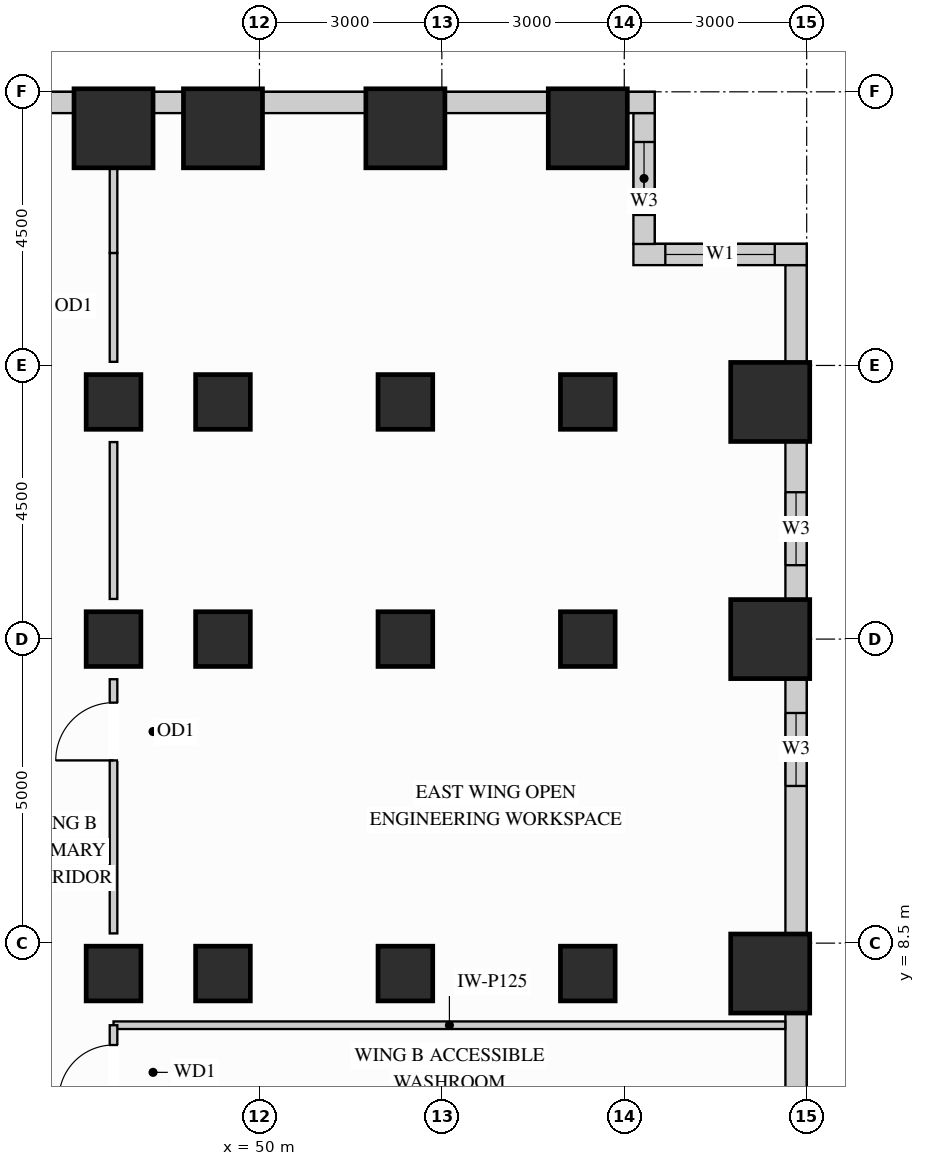
"""IFC4 building model, lengths in metres.
Left out: names, types, materials, properties, quantities, classifications, styles, units other than length and angle.
Written with IfcOpenShell. Run it as: python <this file> out.ifc"""

import sys

from ifc_helpers import new_model, si_unit, direction, frame, frame_2d, origin, origin_2d, place, context, subcontext, project, spatial, rectangle, extrude, source, transform, mapped, element, fill, save


model = new_model("IFC4")
c1 = context("Model", 3, precision=1e-05, world=origin(), true_north=direction((0.0, 1.0)))
c2 = subcontext(c1, "Body", "Model", "MODEL_VIEW")
j1 = project(units=[si_unit("LENGTHUNIT", "METRE"), si_unit("PLANEANGLEUNIT", "RADIAN")], contexts=[c1])
p1 = place(None, origin())
s1 = spatial("IfcSite", under=j1, at=p1, CompositionType="ELEMENT")
p2 = place(p1, origin())
s2 = spatial("IfcBuilding", under=s1, at=p2, CompositionType="ELEMENT")
p3 = place(p2, frame((0.0, 0.0, 65.7)))
s3 = spatial("IfcBuildingStorey", under=s2, at=p3, CompositionType="ELEMENT", Elevation=65.7)
m1 = source(origin(), c2, "Body", "SweptSolid", [
    extrude(rectangle(XDim=0.9, YDim=0.9, at=origin_2d()), origin(), (0.0, 0.0, 1.0), 3.38),
])
for number, where, z_axis, x_axis in (
    (1, (47.6, 13.5, 0.0), (0.0, 0.0, 1.0), (1.0, 0.0, 0.0)),
    (2, (47.6, 8.0, 0.0), (0.0, 0.0, 1.0), (1.0, 0.0, 0.0)),
    (3, (47.6, 17.4, 0.0), (0.0, 0.0, 1.0), (1.0, 0.0, 0.0)),
    (4, (49.4, 13.5, 0.0), (0.0, 0.0, 1.0), (1.0, 0.0, 0.0)),
    (5, (49.4, 17.4, 0.0), (0.0, 0.0, 1.0), (1.0, 0.0, 0.0)),
    (6, (49.4, 8.0, 0.0), (0.0, 0.0, 1.0), (1.0, 0.0, 0.0)),
    (7, (52.4, 13.5, 0.0), (0.0, 0.0, 1.0), (1.0, 0.0, 0.0)),
    (8, (52.4, 17.4, 0.0), (0.0, 0.0, 1.0), (1.0, 0.0, 0.0)),
    (9, (52.4, 8.0, 0.0), (0.0, 0.0, 1.0), (1.0, 0.0, 0.0)),
    (10, (55.4, 13.5, 0.0), (0.0, 0.0, 1.0), (1.0, 0.0, 0.0)),
    (11, (55.4, 17.4, 0.0), (0.0, 0.0, 1.0), (1.0, 0.0, 0.0)),
    (12, (55.4, 8.0, 0.0), (0.0, 0.0, 1.0), (1.0, 0.0, 0.0)),
):
    element("IfcColumn", number, at=place(p3, frame(where, z_axis=z_axis, x_axis=x_axis)), inside=s3, PredefinedType="COLUMN", context=c2, shape_type="MappedRepresentation", body=[
        mapped(m1, transform((0.0, 0.0, 0.0), x_axis=(1.0, 0.0, 0.0), y_axis=(0.0, 1.0, 0.0), z_axis=(0.0, 0.0, 1.0))),
    ])
m2 = source(origin(), c2, "Body", "SweptSolid", [
    extrude(rectangle(XDim=1.3, YDim=1.3, at=origin_2d()), origin(), (0.0, 0.0, 1.0), 3.38),
])
for number, where, z_axis, x_axis in (
    (13, (47.6, 21.9, 0.0), (0.0, 0.0, 1.0), (1.0, 0.0, 0.0)),
    (14, (49.4, 21.9, 0.0), (0.0, 0.0, 1.0), (1.0, 0.0, 0.0)),
    (15, (52.4, 21.9, 0.0), (0.0, 0.0, 1.0), (1.0, 0.0, 0.0)),
    (16, (55.4, 21.9, 0.0), (0.0, 0.0, 1.0), (1.0, 0.0, 0.0)),
    (17, (58.4, 13.5, 0.0), (0.0, 0.0, 1.0), (1.0, 0.0, 0.0)),
    (18, (58.4, 17.4, 0.0), (0.0, 0.0, 1.0), (1.0, 0.0, 0.0)),
    (19, (58.4, 8.0, 0.0), (0.0, 0.0, 1.0), (1.0, 0.0, 0.0)),
):
    element("IfcColumn", number, at=place(p3, frame(where, z_axis=z_axis, x_axis=x_axis)), inside=s3, PredefinedType="COLUMN", context=c2, shape_type="MappedRepresentation", body=[
        mapped(m2, transform((0.0, 0.0, 0.0), x_axis=(1.0, 0.0, 0.0), y_axis=(0.0, 1.0, 0.0), z_axis=(0.0, 0.0, 1.0))),
    ])
m3 = source(origin(), c2, "Body", "SweptSolid", [
    extrude(rectangle(XDim=3.204, YDim=0.35, at=frame_2d((1.602, 0.0))), origin(), (0.0, 0.0, 1.0), 2.51),
])
p4 = place(p3, frame((58.825, 4.148, 0.0), z_axis=(0.0, 0.0, 1.0), x_axis=(0.0, 1.0, 0.0)))
e20 = element("IfcWall", 20, at=p4, inside=s3, PredefinedType="SOLIDWALL", context=c2, shape_type="MappedRepresentation", body=[
    mapped(m3, transform((0.0, 0.0, 0.0), x_axis=(1.0, 0.0, 0.0), y_axis=(0.0, 1.0, 0.0), z_axis=(0.0, 0.0, 1.0))),
])
p5 = place(p3, frame((58.825, 8.648, 0.0), z_axis=(0.0, 0.0, 1.0), x_axis=(0.0, 1.0, 0.0)))
e21 = element("IfcWall", 21, at=p5, inside=s3, PredefinedType="SOLIDWALL", context=c2, shape_type="SweptSolid", body=[
    extrude(rectangle(XDim=4.204, YDim=0.35, at=frame_2d((2.102, 0.0))), origin(), (0.0, 0.0, 1.0), 2.51),
])
p6 = place(p5, frame((2.437, 0.0, 0.78)))
e22 = element("IfcOpeningElement", 22, at=p6, cuts=e21, PredefinedType="OPENING", context=c2, shape_type="SweptSolid", body=[
    extrude(rectangle(XDim=1.2, YDim=1.55, at=frame_2d((0.6, 0.775))), frame((0.0, 0.185, 0.0), z_axis=(0.0, -1.0, 0.0), x_axis=(1.0, 0.0, 0.0)), (0.0, 0.0, 1.0), 0.37),
])
p7 = place(p3, frame((58.825, 14.148, 0.0), z_axis=(0.0, 0.0, 1.0), x_axis=(0.0, 1.0, 0.0)))
e23 = element("IfcWall", 23, at=p7, inside=s3, PredefinedType="SOLIDWALL", context=c2, shape_type="SweptSolid", body=[
    extrude(rectangle(XDim=2.604, YDim=0.35, at=frame_2d((1.302, 0.0))), origin(), (0.0, 0.0, 1.0), 2.51),
])
p8 = place(p7, frame((0.567, 0.0, 0.78)))
e24 = element("IfcOpeningElement", 24, at=p8, cuts=e23, PredefinedType="OPENING", context=c2, shape_type="SweptSolid", body=[
    extrude(rectangle(XDim=1.2, YDim=1.55, at=frame_2d((0.6, 0.775))), frame((0.0, 0.185, 0.0), z_axis=(0.0, -1.0, 0.0), x_axis=(1.0, 0.0, 0.0)), (0.0, 0.0, 1.0), 0.37),
])
m4 = source(origin(), c2, "Body", "SweptSolid", [
    extrude(rectangle(XDim=1.604, YDim=0.35, at=frame_2d((0.802, 0.0))), origin(), (0.0, 0.0, 1.0), 3.365),
])
p9 = place(p3, frame((58.825, 18.048, 0.0), z_axis=(0.0, 0.0, 1.0), x_axis=(0.0, 1.0, 0.0)))
e25 = element("IfcWall", 25, at=p9, inside=s3, PredefinedType="SOLIDWALL", context=c2, shape_type="MappedRepresentation", body=[
    mapped(m4, transform((0.0, 0.0, 0.0), x_axis=(1.0, 0.0, 0.0), y_axis=(0.0, 1.0, 0.0), z_axis=(0.0, 0.0, 1.0))),
])
p10 = place(p3, frame((59.0, 19.825, 0.0), z_axis=(0.0, 0.0, 1.0), x_axis=(-1.0, 0.0, 0.0)))
e26 = element("IfcWall", 26, at=p10, inside=s3, PredefinedType="SOLIDWALL", context=c2, shape_type="SweptSolid", body=[
    extrude(rectangle(XDim=2.85, YDim=0.35, at=frame_2d((1.425, 0.0))), origin(), (0.0, 0.0, 1.0), 3.365),
])
p11 = place(p10, frame((0.525, 0.0, 0.78)))
e27 = element("IfcOpeningElement", 27, at=p11, cuts=e26, PredefinedType="OPENING", context=c2, shape_type="SweptSolid", body=[
    extrude(rectangle(XDim=1.8, YDim=2.1, at=frame_2d((0.9, 1.05))), frame((0.0, 0.185, 0.0), z_axis=(0.0, -1.0, 0.0), x_axis=(1.0, 0.0, 0.0)), (0.0, 0.0, 1.0), 0.37),
])
p12 = place(p3, frame((56.325, 19.998, 0.0), z_axis=(0.0, 0.0, 1.0), x_axis=(0.0, 1.0, 0.0)))
e28 = element("IfcWall", 28, at=p12, inside=s3, PredefinedType="SOLIDWALL", context=c2, shape_type="SweptSolid", body=[
    extrude(rectangle(XDim=2.154, YDim=0.35, at=frame_2d((1.077, 0.0))), origin(), (0.0, 0.0, 1.0), 3.365),
])
p13 = place(p12, frame((0.477, 0.0, 0.78)))
e29 = element("IfcOpeningElement", 29, at=p13, cuts=e28, PredefinedType="OPENING", context=c2, shape_type="SweptSolid", body=[
    extrude(rectangle(XDim=1.2, YDim=2.1, at=frame_2d((0.6, 1.05))), frame((0.0, 0.185, 0.0), z_axis=(0.0, -1.0, 0.0), x_axis=(1.0, 0.0, 0.0)), (0.0, 0.0, 1.0), 0.37),
])
m5 = source(origin(), c2, "Body", "SweptSolid", [
    extrude(rectangle(XDim=0.452, YDim=0.35, at=frame_2d((0.226, 0.0))), origin(), (0.0, 0.0, 1.0), 3.365),
])
p14 = place(p3, frame((56.5, 22.325, 0.0), z_axis=(0.0, 0.0, 1.0), x_axis=(-1.0, 0.0, 0.0)))
e30 = element("IfcWall", 30, at=p14, inside=s3, PredefinedType="SOLIDWALL", context=c2, shape_type="MappedRepresentation", body=[
    mapped(m5, transform((0.0, 0.0, 0.0), x_axis=(1.0, 0.0, 0.0), y_axis=(0.0, 1.0, 0.0), z_axis=(0.0, 0.0, 1.0))),
])
m6 = source(origin(), c2, "Body", "SweptSolid", [
    extrude(rectangle(XDim=1.704, YDim=0.35, at=frame_2d((0.852, 0.0))), origin(), (0.0, 0.0, 1.0), 2.51),
])
for number, where, z_axis, x_axis in (
    (31, (54.752, 22.325, 0.0), (0.0, 0.0, 1.0), (-1.0, 0.0, 0.0)),
    (32, (51.752, 22.325, 0.0), (0.0, 0.0, 1.0), (-1.0, 0.0, 0.0)),
):
    element("IfcWall", number, at=place(p3, frame(where, z_axis=z_axis, x_axis=x_axis)), inside=s3, PredefinedType="SOLIDWALL", context=c2, shape_type="MappedRepresentation", body=[
        mapped(m6, transform((0.0, 0.0, 0.0), x_axis=(1.0, 0.0, 0.0), y_axis=(0.0, 1.0, 0.0), z_axis=(0.0, 0.0, 1.0))),
    ])
m7 = source(origin(), c2, "Body", "SweptSolid", [
    extrude(rectangle(XDim=0.504, YDim=0.35, at=frame_2d((0.252, 0.0))), origin(), (0.0, 0.0, 1.0), 3.365),
])
p15 = place(p3, frame((48.752, 22.325, 0.0), z_axis=(0.0, 0.0, 1.0), x_axis=(-1.0, 0.0, 0.0)))
e33 = element("IfcWall", 33, at=p15, inside=s3, PredefinedType="SOLIDWALL", context=c2, shape_type="MappedRepresentation", body=[
    mapped(m7, transform((0.0, 0.0, 0.0), x_axis=(1.0, 0.0, 0.0), y_axis=(0.0, 1.0, 0.0), z_axis=(0.0, 0.0, 1.0))),
])
p16 = place(p3, frame((46.952, 22.325, 0.0), z_axis=(0.0, 0.0, 1.0), x_axis=(-1.0, 0.0, 0.0)))
e34 = element("IfcWall", 34, at=p16, inside=s3, PredefinedType="SOLIDWALL", context=c2, shape_type="SweptSolid", body=[
    extrude(rectangle(XDim=6.304, YDim=0.35, at=frame_2d((3.152, 0.0))), origin(), (0.0, 0.0, 1.0), 2.51),
])
p17 = place(p16, frame((1.649, 0.0, 0.78)))
e35 = element("IfcOpeningElement", 35, at=p17, cuts=e34, PredefinedType="OPENING", context=c2, shape_type="SweptSolid", body=[
    extrude(rectangle(XDim=1.8, YDim=1.55, at=frame_2d((0.9, 0.775))), frame((0.0, 0.185, 0.0), z_axis=(0.0, -1.0, 0.0), x_axis=(1.0, 0.0, 0.0)), (0.0, 0.0, 1.0), 0.37),
])
p18 = place(p16, frame((3.817, 0.0, 0.78)))
e36 = element("IfcOpeningElement", 36, at=p18, cuts=e34, PredefinedType="OPENING", context=c2, shape_type="SweptSolid", body=[
    extrude(rectangle(XDim=1.8, YDim=1.55, at=frame_2d((0.9, 0.775))), frame((0.0, 0.185, 0.0), z_axis=(0.0, -1.0, 0.0), x_axis=(1.0, 0.0, 0.0)), (0.0, 0.0, 1.0), 0.37),
])
m8 = source(origin(), c2, "Body", "SweptSolid", [
    extrude(rectangle(XDim=11.048, YDim=0.125, at=frame_2d((5.524, 0.0))), origin(), (0.0, 0.0, 1.0), 3.365),
])
p19 = place(p3, frame((47.6, 7.15, 0.0), z_axis=(0.0, 0.0, 1.0), x_axis=(1.0, 0.0, 0.0)))
e37 = element("IfcWall", 37, at=p19, inside=s3, PredefinedType="PARTITIONING", context=c2, shape_type="MappedRepresentation", body=[
    mapped(m8, transform((0.0, 0.0, 0.0), x_axis=(1.0, 0.0, 0.0), y_axis=(0.0, 1.0, 0.0), z_axis=(0.0, 0.0, 1.0))),
])
p20 = place(p3, frame((47.6, 8.66, 0.0), z_axis=(0.0, 0.0, 1.0), x_axis=(0.0, 1.0, 0.0)))
e38 = element("IfcWall", 38, at=p20, inside=s3, PredefinedType="PARTITIONING", context=c2, shape_type="SweptSolid", body=[
    extrude(rectangle(XDim=4.18, YDim=0.125, at=frame_2d((2.09, 0.0))), origin(), (0.0, 0.0, 1.0), 2.67),
])
p21 = place(p20, frame((2.845, 0.0, 0.0)))
e39 = element("IfcOpeningElement", 39, at=p21, cuts=e38, PredefinedType="OPENING", context=c2, shape_type="SweptSolid", body=[
    extrude(rectangle(XDim=0.95, YDim=2.15, at=frame_2d((0.475, 1.075))), frame((0.0, 0.073, 0.0), z_axis=(0.0, -1.0, 0.0), x_axis=(1.0, 0.0, 0.0)), (0.0, 0.0, 1.0), 0.145),
])
m9 = source(origin(), c2, "Body", "SweptSolid", [
    extrude(rectangle(XDim=2.58, YDim=0.125, at=frame_2d((1.29, 0.0))), origin(), (0.0, 0.0, 1.0), 2.67),
])
p22 = place(p3, frame((47.6, 14.16, 0.0), z_axis=(0.0, 0.0, 1.0), x_axis=(0.0, 1.0, 0.0)))
e40 = element("IfcWall", 40, at=p22, inside=s3, PredefinedType="PARTITIONING", context=c2, shape_type="MappedRepresentation", body=[
    mapped(m9, transform((0.0, 0.0, 0.0), x_axis=(1.0, 0.0, 0.0), y_axis=(0.0, 1.0, 0.0), z_axis=(0.0, 0.0, 1.0))),
])
m10 = source(origin(), c2, "Body", "SweptSolid", [
    extrude(rectangle(XDim=1.79, YDim=0.125, at=frame_2d((0.895, 0.0))), origin(), (0.0, 0.0, 1.0), 2.67),
])
p23 = place(p3, frame((47.6, 18.06, 0.0), z_axis=(0.0, 0.0, 1.0), x_axis=(0.0, 1.0, 0.0)))
e41 = element("IfcWall", 41, at=p23, inside=s3, PredefinedType="PARTITIONING", context=c2, shape_type="MappedRepresentation", body=[
    mapped(m10, transform((0.0, 0.0, 0.0), x_axis=(1.0, 0.0, 0.0), y_axis=(0.0, 1.0, 0.0), z_axis=(0.0, 0.0, 1.0))),
])
m11 = source(origin(), c2, "Body", "SweptSolid", [
    extrude(rectangle(XDim=1.39, YDim=0.125, at=frame_2d((0.695, 0.0))), origin(), (0.0, 0.0, 1.0), 2.67),
])
p24 = place(p3, frame((47.6, 19.85, 0.0), z_axis=(0.0, 0.0, 1.0), x_axis=(0.0, 1.0, 0.0)))
e42 = element("IfcWall", 42, at=p24, inside=s3, PredefinedType="PARTITIONING", context=c2, shape_type="MappedRepresentation", body=[
    mapped(m11, transform((0.0, 0.0, 0.0), x_axis=(1.0, 0.0, 0.0), y_axis=(0.0, 1.0, 0.0), z_axis=(0.0, 0.0, 1.0))),
])
p25 = place(p3, frame((47.6, 5.65, 0.0), z_axis=(0.0, 0.0, 1.0), x_axis=(0.0, 1.0, 0.0)))
e43 = element("IfcWall", 43, at=p25, inside=s3, PredefinedType="PARTITIONING", context=c2, shape_type="SweptSolid", body=[
    extrude(rectangle(XDim=1.5, YDim=0.125, at=frame_2d((0.75, 0.0))), origin(), (0.0, 0.0, 1.0), 2.67),
])
p26 = place(p25, frame((0.275, 0.0, 0.0)))
e44 = element("IfcOpeningElement", 44, at=p26, cuts=e43, PredefinedType="OPENING", context=c2, shape_type="SweptSolid", body=[
    extrude(rectangle(XDim=0.9, YDim=2.15, at=frame_2d((0.45, 1.075))), frame((0.0, 0.073, 0.0), z_axis=(0.0, -1.0, 0.0), x_axis=(1.0, 0.0, 0.0)), (0.0, 0.0, 1.0), 0.145),
])
m12 = source(origin(), c2, "Body", "SweptSolid", [
    extrude(rectangle(XDim=0.95, YDim=2.15, at=frame_2d((0.475, 1.075))), frame((0.0, 0.025, 0.0), z_axis=(0.0, -1.0, 0.0), x_axis=(1.0, 0.0, 0.0)), (0.0, 0.0, 1.0), 0.05),
])
p27 = place(p21, origin())
e45 = element("IfcDoor", 45, at=p27, inside=s3, OperationType="SINGLE_SWING_LEFT", PredefinedType="DOOR", context=c2, shape_type="MappedRepresentation", body=[
    mapped(m12, transform((0.0, 0.0, 0.0), x_axis=(1.0, 0.0, 0.0), y_axis=(0.0, 1.0, 0.0), z_axis=(0.0, 0.0, 1.0))),
])
fill(e39, e45)
m13 = source(origin(), c2, "Body", "SweptSolid", [
    extrude(rectangle(XDim=0.9, YDim=2.15, at=frame_2d((0.45, 1.075))), frame((0.0, 0.025, 0.0), z_axis=(0.0, -1.0, 0.0), x_axis=(1.0, 0.0, 0.0)), (0.0, 0.0, 1.0), 0.05),
])
p28 = place(p26, origin())
e46 = element("IfcDoor", 46, at=p28, inside=s3, OperationType="SINGLE_SWING_LEFT", PredefinedType="DOOR", context=c2, shape_type="MappedRepresentation", body=[
    mapped(m13, transform((0.0, 0.0, 0.0), x_axis=(1.0, 0.0, 0.0), y_axis=(0.0, 1.0, 0.0), z_axis=(0.0, 0.0, 1.0))),
])
fill(e44, e46)
m14 = source(origin(), c2, "Body", "SweptSolid", [
    extrude(rectangle(XDim=1.8, YDim=2.1, at=frame_2d((0.9, 1.05))), frame((0.0, 0.03, 0.0), z_axis=(0.0, -1.0, 0.0), x_axis=(1.0, 0.0, 0.0)), (0.0, 0.0, 1.0), 0.06),
])
p29 = place(p11, origin())
e47 = element("IfcWindow", 47, at=p29, inside=s3, PartitioningType="SINGLE_PANEL", PredefinedType="WINDOW", context=c2, shape_type="MappedRepresentation", body=[
    mapped(m14, transform((0.0, 0.0, 0.0), x_axis=(1.0, 0.0, 0.0), y_axis=(0.0, 1.0, 0.0), z_axis=(0.0, 0.0, 1.0))),
])
fill(e27, e47)
m15 = source(origin(), c2, "Body", "SweptSolid", [
    extrude(rectangle(XDim=1.2, YDim=1.55, at=frame_2d((0.6, 0.775))), frame((0.0, 0.03, 0.0), z_axis=(0.0, -1.0, 0.0), x_axis=(1.0, 0.0, 0.0)), (0.0, 0.0, 1.0), 0.06),
])
p30 = place(p6, origin())
e48 = element("IfcWindow", 48, at=p30, inside=s3, PartitioningType="SINGLE_PANEL", PredefinedType="WINDOW", context=c2, shape_type="MappedRepresentation", body=[
    mapped(m15, transform((0.0, 0.0, 0.0), x_axis=(1.0, 0.0, 0.0), y_axis=(0.0, 1.0, 0.0), z_axis=(0.0, 0.0, 1.0))),
])
fill(e22, e48)
p31 = place(p8, origin())
e49 = element("IfcWindow", 49, at=p31, inside=s3, PartitioningType="SINGLE_PANEL", PredefinedType="WINDOW", context=c2, shape_type="MappedRepresentation", body=[
    mapped(m15, transform((0.0, 0.0, 0.0), x_axis=(1.0, 0.0, 0.0), y_axis=(0.0, 1.0, 0.0), z_axis=(0.0, 0.0, 1.0))),
])
fill(e24, e49)
m16 = source(origin(), c2, "Body", "SweptSolid", [
    extrude(rectangle(XDim=1.2, YDim=2.1, at=frame_2d((0.6, 1.05))), frame((0.0, 0.03, 0.0), z_axis=(0.0, -1.0, 0.0), x_axis=(1.0, 0.0, 0.0)), (0.0, 0.0, 1.0), 0.06),
])
p32 = place(p13, origin())
e50 = element("IfcWindow", 50, at=p32, inside=s3, PartitioningType="SINGLE_PANEL", PredefinedType="WINDOW", context=c2, shape_type="MappedRepresentation", body=[
    mapped(m16, transform((0.0, 0.0, 0.0), x_axis=(1.0, 0.0, 0.0), y_axis=(0.0, 1.0, 0.0), z_axis=(0.0, 0.0, 1.0))),
])
fill(e29, e50)
save(model, sys.argv[1])
